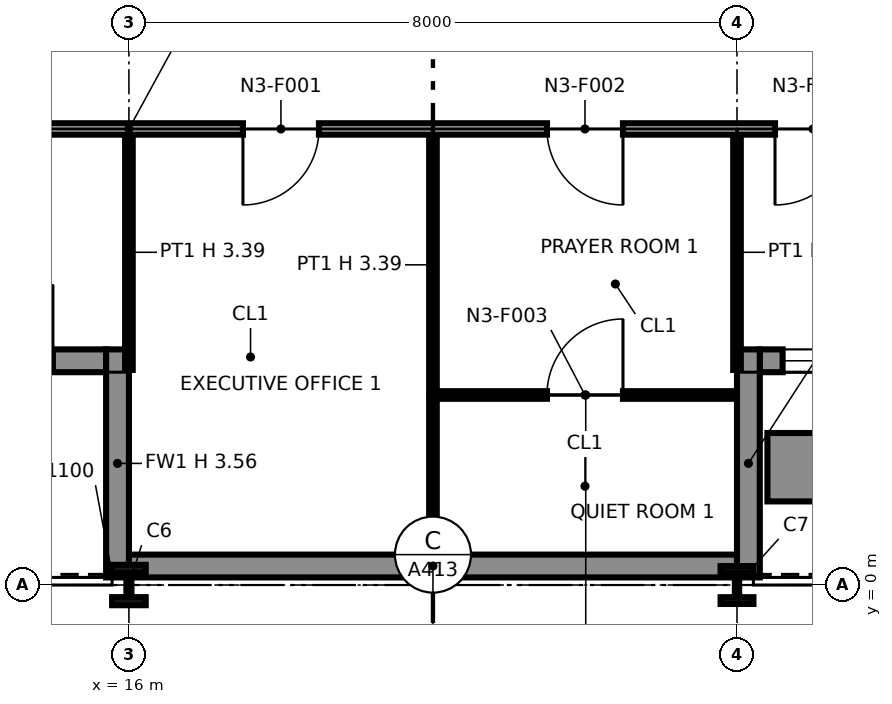
"""IFC4 building model, lengths in metres.
Left out: names, types, materials, properties, quantities, classifications, styles, units other than length and angle.
Written with IfcOpenShell. Run it as: python <this file> out.ifc"""

import sys

from ifc_helpers import new_model, si_unit, direction, frame, frame_2d, origin, origin_2d, place, context, subcontext, project, spatial, rectangle, i_section, extrude, element, fill, save


model = new_model("IFC4")
c1 = context("Model", 3, precision=1e-05, world=origin(), true_north=direction((0.0, 1.0)))
c2 = subcontext(c1, "Body", "Model", "MODEL_VIEW")
j1 = project(units=[si_unit("LENGTHUNIT", "METRE"), si_unit("PLANEANGLEUNIT", "RADIAN")], contexts=[c1])
p1 = place(None, origin())
s1 = spatial("IfcSite", under=j1, at=p1, CompositionType="ELEMENT")
p2 = place(p1, origin())
s2 = spatial("IfcBuilding", under=s1, at=p2, CompositionType="ELEMENT")
p3 = place(p2, frame((0.0, 0.0, 61.2)))
s3 = spatial("IfcBuildingStorey", under=s2, at=p3, CompositionType="ELEMENT", Elevation=61.2)
p4 = place(p3, frame((16.0, 0.0, 0.0), z_axis=(0.0, 0.0, 1.0), x_axis=(1.0, 0.0, 0.0)))
e1 = element("IfcColumn", 1, at=p4, inside=s3, PredefinedType="COLUMN", context=c2, shape_type="SweptSolid", body=[
    extrude(i_section(OverallWidth=0.442, OverallDepth=0.531, WebThickness=0.066, FlangeThickness=0.106, at=origin_2d()), origin(), (0.0, 0.0, 1.0), 4.25),
])
p5 = place(p3, frame((24.0, 0.0, 0.0), z_axis=(0.0, 0.0, 1.0), x_axis=(1.0, 0.0, 0.0)))
e2 = element("IfcColumn", 2, at=p5, inside=s3, PredefinedType="COLUMN", context=c2, shape_type="SweptSolid", body=[
    extrude(i_section(OverallWidth=0.432, OverallDepth=0.498, WebThickness=0.056, FlangeThickness=0.089, at=origin_2d()), origin(), (0.0, 0.0, 1.0), 4.25),
])
p6 = place(p3, frame((8.3, 2.95, 0.0), z_axis=(0.0, 0.0, 1.0), x_axis=(1.0, 0.0, 0.0)))
e3 = element("IfcWall", 3, at=p6, inside=s3, PredefinedType="SOLIDWALL", context=c2, shape_type="SweptSolid", body=[
    extrude(rectangle(XDim=7.4, YDim=0.3, at=frame_2d((3.7, 0.0))), origin(), (0.0, 0.0, 1.0), 4.25),
])
p7 = place(p6, frame((0.3, 0.0, 0.9)))
e4 = element("IfcOpeningElement", 4, at=p7, cuts=e3, PredefinedType="OPENING", context=c2, shape_type="SweptSolid", body=[
    extrude(rectangle(XDim=2.8, YDim=2.2, at=frame_2d((1.4, 1.1))), frame((0.0, 0.16, 0.0), z_axis=(0.0, -1.0, 0.0), x_axis=(1.0, 0.0, 0.0)), (0.0, 0.0, 1.0), 0.32),
])
p8 = place(p6, frame((4.7, 0.0, 0.0)))
e5 = element("IfcOpeningElement", 5, at=p8, cuts=e3, PredefinedType="OPENING", context=c2, shape_type="SweptSolid", body=[
    extrude(rectangle(XDim=2.0, YDim=2.4, at=frame_2d((1.0, 1.2))), frame((0.0, 0.16, 0.0), z_axis=(0.0, -1.0, 0.0), x_axis=(1.0, 0.0, 0.0)), (0.0, 0.0, 1.0), 0.32),
])
p9 = place(p3, frame((15.85, 0.1, 0.0), z_axis=(0.0, 0.0, 1.0), x_axis=(0.0, 1.0, 0.0)))
e6 = element("IfcWall", 6, at=p9, inside=s3, PredefinedType="SOLIDWALL", context=c2, shape_type="SweptSolid", body=[
    extrude(rectangle(XDim=3.0, YDim=0.3, at=frame_2d((1.5, 0.0))), origin(), (0.0, 0.0, 1.0), 3.556),
])
p10 = place(p3, frame((16.0, 0.25, 0.0), z_axis=(0.0, 0.0, 1.0), x_axis=(1.0, 0.0, 0.0)))
e7 = element("IfcWall", 7, at=p10, inside=s3, PredefinedType="SOLIDWALL", context=c2, shape_type="SweptSolid", body=[
    extrude(rectangle(XDim=8.0, YDim=0.3, at=frame_2d((4.0, 0.0))), origin(), (0.0, 0.0, 1.0), 4.25),
])
p11 = place(p3, frame((24.3, 2.95, 0.0), z_axis=(0.0, 0.0, 1.0), x_axis=(1.0, 0.0, 0.0)))
e8 = element("IfcWall", 8, at=p11, inside=s3, PredefinedType="SOLIDWALL", context=c2, shape_type="SweptSolid", body=[
    extrude(rectangle(XDim=7.4, YDim=0.3, at=frame_2d((3.7, 0.0))), origin(), (0.0, 0.0, 1.0), 4.25),
])
p12 = place(p11, frame((0.3, 0.0, 0.9)))
e9 = element("IfcOpeningElement", 9, at=p12, cuts=e8, PredefinedType="OPENING", context=c2, shape_type="SweptSolid", body=[
    extrude(rectangle(XDim=2.8, YDim=2.2, at=frame_2d((1.4, 1.1))), frame((0.0, 0.16, 0.0), z_axis=(0.0, -1.0, 0.0), x_axis=(1.0, 0.0, 0.0)), (0.0, 0.0, 1.0), 0.32),
])
p13 = place(p11, frame((4.7, 0.0, 0.0)))
e10 = element("IfcOpeningElement", 10, at=p13, cuts=e8, PredefinedType="OPENING", context=c2, shape_type="SweptSolid", body=[
    extrude(rectangle(XDim=2.0, YDim=2.4, at=frame_2d((1.0, 1.2))), frame((0.0, 0.16, 0.0), z_axis=(0.0, -1.0, 0.0), x_axis=(1.0, 0.0, 0.0)), (0.0, 0.0, 1.0), 0.32),
])
p14 = place(p3, frame((24.15, 0.1, 0.0), z_axis=(0.0, 0.0, 1.0), x_axis=(0.0, 1.0, 0.0)))
e11 = element("IfcWall", 11, at=p14, inside=s3, PredefinedType="SOLIDWALL", context=c2, shape_type="SweptSolid", body=[
    extrude(rectangle(XDim=3.0, YDim=0.3, at=frame_2d((1.5, 0.0))), origin(), (0.0, 0.0, 1.0), 3.556),
])
p15 = place(p3, frame((24.4, 1.55, 0.0), z_axis=(0.0, 0.0, 1.0), x_axis=(1.0, 0.0, 0.0)))
e12 = element("IfcWall", 12, at=p15, inside=s3, PredefinedType="SOLIDWALL", context=c2, shape_type="SweptSolid", body=[
    extrude(rectangle(XDim=3.2, YDim=0.9, at=frame_2d((1.6, 0.0))), origin(), (0.0, 0.0, 1.0), 0.6),
])
p16 = place(p3, frame((20.0, 0.13, 0.0), z_axis=(0.0, 0.0, 1.0), x_axis=(0.0, 1.0, 0.0)))
e13 = element("IfcWall", 13, at=p16, inside=s3, PredefinedType="PARTITIONING", context=c2, shape_type="SweptSolid", body=[
    extrude(rectangle(XDim=2.32, YDim=0.1, at=frame_2d((1.16, 0.0))), origin(), (0.0, 0.0, 1.0), 4.25),
])
p17 = place(p3, frame((20.05, 2.5, 0.0), z_axis=(0.0, 0.0, 1.0), x_axis=(1.0, 0.0, 0.0)))
e14 = element("IfcWall", 14, at=p17, inside=s3, PredefinedType="PARTITIONING", context=c2, shape_type="SweptSolid", body=[
    extrude(rectangle(XDim=3.92, YDim=0.1, at=frame_2d((1.96, 0.0))), origin(), (0.0, 0.0, 1.0), 4.25),
])
p18 = place(p17, frame((1.45, 0.0, 0.0)))
e15 = element("IfcOpeningElement", 15, at=p18, cuts=e14, PredefinedType="OPENING", context=c2, shape_type="SweptSolid", body=[
    extrude(rectangle(XDim=1.0, YDim=2.1, at=frame_2d((0.5, 1.05))), frame((0.0, 0.06, 0.0), z_axis=(0.0, -1.0, 0.0), x_axis=(1.0, 0.0, 0.0)), (0.0, 0.0, 1.0), 0.12),
])
p19 = place(p3, frame((20.0, 2.5, 0.0), z_axis=(0.0, 0.0, 1.0), x_axis=(0.0, 1.0, 0.0)))
e16 = element("IfcWall", 16, at=p19, inside=s3, PredefinedType="PARTITIONING", context=c2, shape_type="SweptSolid", body=[
    extrude(rectangle(XDim=3.425, YDim=0.1, at=frame_2d((1.712, 0.0))), origin(), (0.0, 0.0, 1.0), 3.391),
])
for number, where, z_axis, x_axis in (
    (17, (16.0, 2.83, 0.0), (0.0, 0.0, 1.0), (0.0, 1.0, 0.0)),
    (18, (24.0, 2.83, 0.0), (0.0, 0.0, 1.0), (0.0, 1.0, 0.0)),
):
    element("IfcWall", number, at=place(p3, frame(where, z_axis=z_axis, x_axis=x_axis)), inside=s3, PredefinedType="PARTITIONING", context=c2, shape_type="SweptSolid", body=[
        extrude(rectangle(XDim=3.095, YDim=0.1, at=frame_2d((1.547, 0.0))), origin(), (0.0, 0.0, 1.0), 3.391),
    ])
p20 = place(p3, frame((6.075, 6.0, 0.0), z_axis=(0.0, 0.0, 1.0), x_axis=(1.0, 0.0, 0.0)))
e19 = element("IfcWall", 19, at=p20, inside=s3, PredefinedType="PARTITIONING", context=c2, shape_type="SweptSolid", body=[
    extrude(rectangle(XDim=19.85, YDim=0.15, at=frame_2d((9.925, 0.0))), origin(), (0.0, 0.0, 1.0), 4.25),
])
p21 = place(p20, frame((12.425, 0.0, 0.0), z_axis=(0.0, 0.0, 1.0), x_axis=(-1.0, 0.0, 0.0)))
e20 = element("IfcOpeningElement", 20, at=p21, cuts=e19, PredefinedType="OPENING", context=c2, shape_type="SweptSolid", body=[
    extrude(rectangle(XDim=1.0, YDim=2.1, at=frame_2d((0.5, 1.05))), frame((0.0, 0.085, 0.0), z_axis=(0.0, -1.0, 0.0), x_axis=(1.0, 0.0, 0.0)), (0.0, 0.0, 1.0), 0.17),
])
p22 = place(p20, frame((16.425, 0.0, 0.0), z_axis=(0.0, 0.0, 1.0), x_axis=(-1.0, 0.0, 0.0)))
e21 = element("IfcOpeningElement", 21, at=p22, cuts=e19, PredefinedType="OPENING", context=c2, shape_type="SweptSolid", body=[
    extrude(rectangle(XDim=1.0, YDim=2.1, at=frame_2d((0.5, 1.05))), frame((0.0, 0.085, 0.0), z_axis=(0.0, -1.0, 0.0), x_axis=(1.0, 0.0, 0.0)), (0.0, 0.0, 1.0), 0.17),
])
p23 = place(p20, frame((4.425, 0.0, 0.0), z_axis=(0.0, 0.0, 1.0), x_axis=(-1.0, 0.0, 0.0)))
e22 = element("IfcOpeningElement", 22, at=p23, cuts=e19, PredefinedType="OPENING", context=c2, shape_type="SweptSolid", body=[
    extrude(rectangle(XDim=1.0, YDim=2.1, at=frame_2d((0.5, 1.05))), frame((0.0, 0.085, 0.0), z_axis=(0.0, -1.0, 0.0), x_axis=(1.0, 0.0, 0.0)), (0.0, 0.0, 1.0), 0.17),
])
p24 = place(p20, frame((8.425, 0.0, 0.0), z_axis=(0.0, 0.0, 1.0), x_axis=(-1.0, 0.0, 0.0)))
e23 = element("IfcOpeningElement", 23, at=p24, cuts=e19, PredefinedType="OPENING", context=c2, shape_type="SweptSolid", body=[
    extrude(rectangle(XDim=1.0, YDim=2.1, at=frame_2d((0.5, 1.05))), frame((0.0, 0.085, 0.0), z_axis=(0.0, -1.0, 0.0), x_axis=(1.0, 0.0, 0.0)), (0.0, 0.0, 1.0), 0.17),
])
p25 = place(p20, frame((19.425, 0.0, 0.0), z_axis=(0.0, 0.0, 1.0), x_axis=(-1.0, 0.0, 0.0)))
e24 = element("IfcOpeningElement", 24, at=p25, cuts=e19, PredefinedType="OPENING", context=c2, shape_type="SweptSolid", body=[
    extrude(rectangle(XDim=1.0, YDim=2.1, at=frame_2d((0.5, 1.05))), frame((0.0, 0.085, 0.0), z_axis=(0.0, -1.0, 0.0), x_axis=(1.0, 0.0, 0.0)), (0.0, 0.0, 1.0), 0.17),
])
p26 = place(p12, origin())
e25 = element("IfcWindow", 25, at=p26, inside=s3, PartitioningType="SINGLE_PANEL", PredefinedType="WINDOW", context=c2, shape_type="SweptSolid", body=[
    extrude(rectangle(XDim=2.8, YDim=2.2, at=frame_2d((1.4, 1.1))), frame((0.0, 0.03, 0.0), z_axis=(0.0, -1.0, 0.0), x_axis=(1.0, 0.0, 0.0)), (0.0, 0.0, 1.0), 0.06),
])
fill(e9, e25)
p27 = place(p21, origin())
e26 = element("IfcDoor", 26, at=p27, inside=s3, OperationType="SINGLE_SWING_RIGHT", PredefinedType="DOOR", context=c2, shape_type="SweptSolid", body=[
    extrude(rectangle(XDim=1.0, YDim=2.1, at=frame_2d((0.5, 1.05))), frame((0.0, 0.025, 0.0), z_axis=(0.0, -1.0, 0.0), x_axis=(1.0, 0.0, 0.0)), (0.0, 0.0, 1.0), 0.05),
])
fill(e20, e26)
p28 = place(p22, origin())
e27 = element("IfcDoor", 27, at=p28, inside=s3, OperationType="SINGLE_SWING_LEFT", PredefinedType="DOOR", context=c2, shape_type="SweptSolid", body=[
    extrude(rectangle(XDim=1.0, YDim=2.1, at=frame_2d((0.5, 1.05))), frame((0.0, 0.025, 0.0), z_axis=(0.0, -1.0, 0.0), x_axis=(1.0, 0.0, 0.0)), (0.0, 0.0, 1.0), 0.05),
])
fill(e21, e27)
p29 = place(p18, origin())
e28 = element("IfcDoor", 28, at=p29, inside=s3, OperationType="SINGLE_SWING_RIGHT", PredefinedType="DOOR", context=c2, shape_type="SweptSolid", body=[
    extrude(rectangle(XDim=1.0, YDim=2.1, at=frame_2d((0.5, 1.05))), frame((0.0, 0.025, 0.0), z_axis=(0.0, -1.0, 0.0), x_axis=(1.0, 0.0, 0.0)), (0.0, 0.0, 1.0), 0.05),
])
fill(e15, e28)
p30 = place(p25, origin())
e29 = element("IfcDoor", 29, at=p30, inside=s3, OperationType="SINGLE_SWING_RIGHT", PredefinedType="DOOR", context=c2, shape_type="SweptSolid", body=[
    extrude(rectangle(XDim=1.0, YDim=2.1, at=frame_2d((0.5, 1.05))), frame((0.0, 0.025, 0.0), z_axis=(0.0, -1.0, 0.0), x_axis=(1.0, 0.0, 0.0)), (0.0, 0.0, 1.0), 0.05),
])
fill(e24, e29)
save(model, sys.argv[1])
